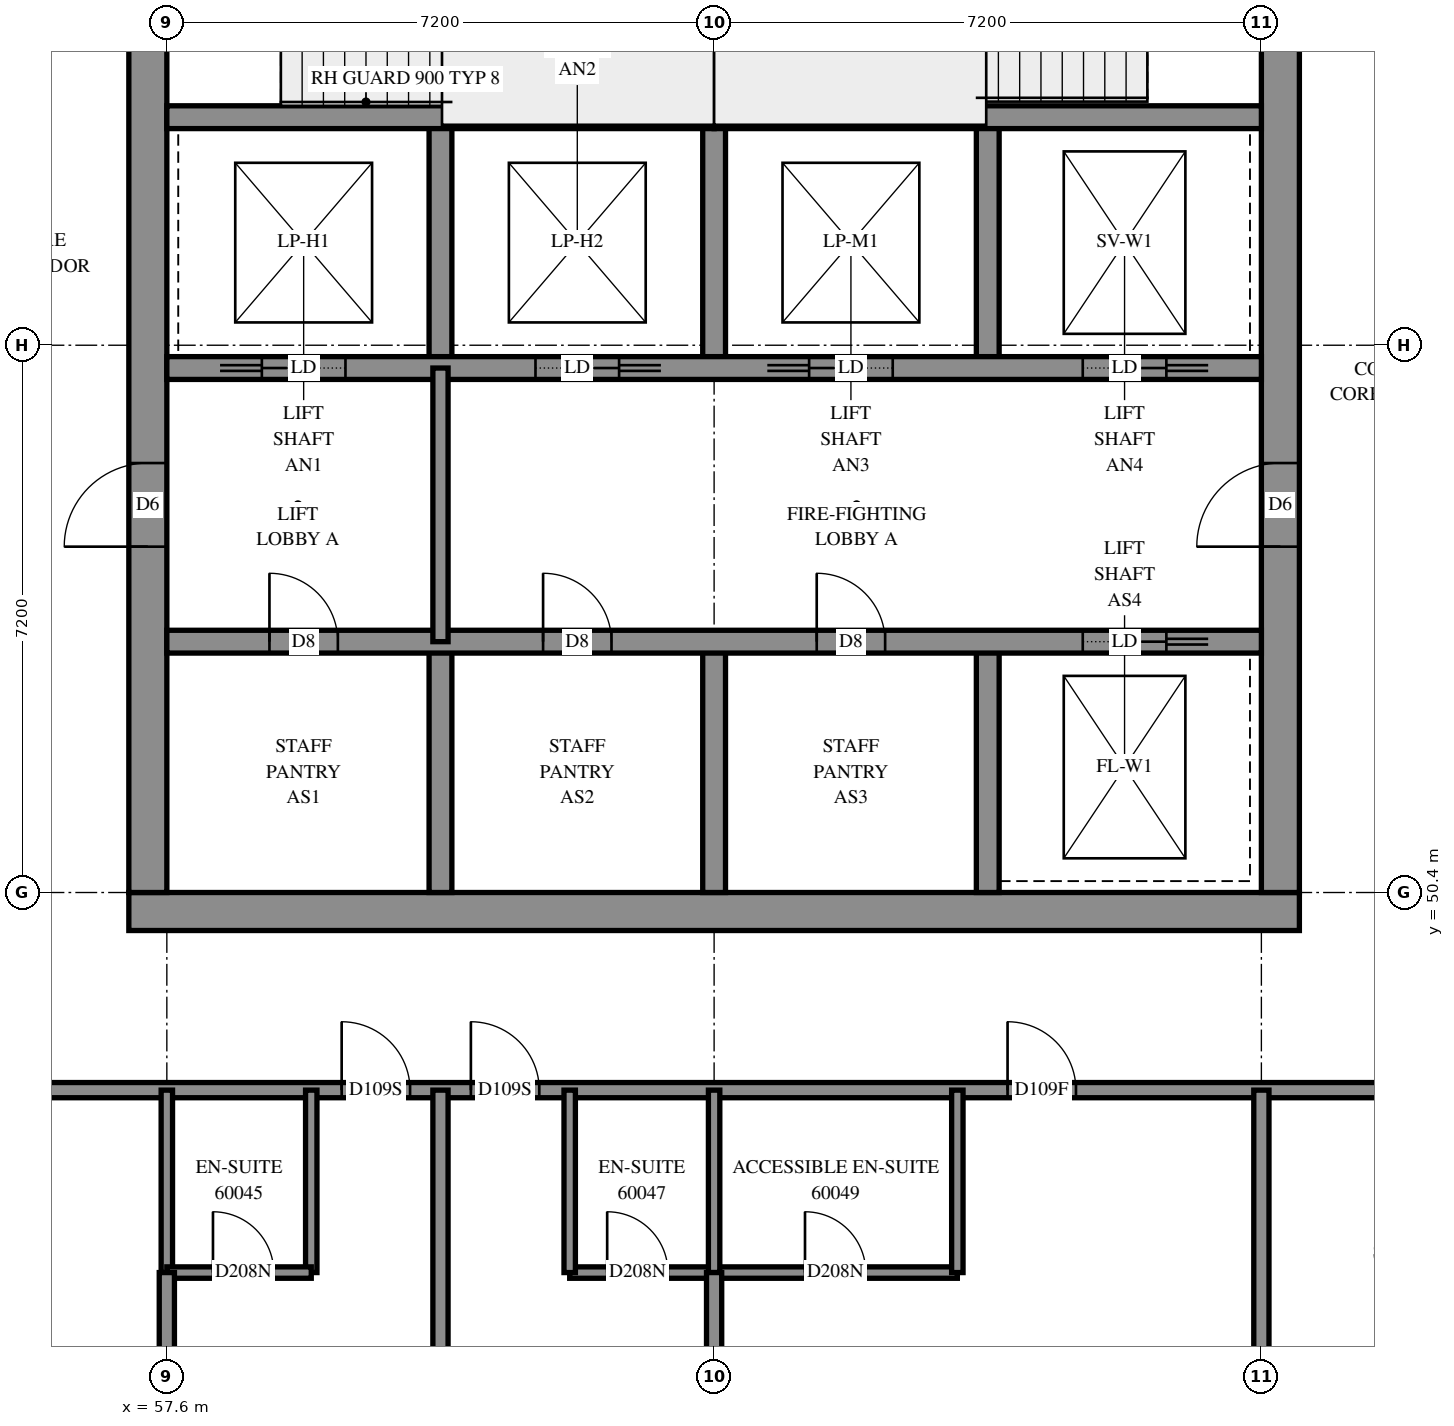
"""IFC4 building model, lengths in metres.
Left out: names, types, materials, properties, quantities, classifications, styles, units other than length and angle.
Written with IfcOpenShell. Run it as: python <this file> out.ifc"""

import sys

from ifc_helpers import new_model, si_unit, direction, frame, frame_2d, origin, place, context, subcontext, project, spatial, rectangle, extrude, element, fill, save


model = new_model("IFC4")
c1 = context("Model", 3, precision=1e-05, world=origin(), true_north=direction((0.0, 1.0)))
c2 = subcontext(c1, "Body", "Model", "MODEL_VIEW")
j1 = project(units=[si_unit("LENGTHUNIT", "METRE"), si_unit("PLANEANGLEUNIT", "RADIAN")], contexts=[c1])
p1 = place(None, origin())
s1 = spatial("IfcSite", under=j1, at=p1, CompositionType="ELEMENT")
p2 = place(p1, origin())
s2 = spatial("IfcBuilding", under=s1, at=p2, CompositionType="ELEMENT")
p3 = place(p2, frame((0.0, 0.0, 220.2)))
s3 = spatial("IfcBuildingStorey", under=s2, at=p3, CompositionType="ELEMENT", Elevation=220.2)
p4 = place(p3, frame((57.1, 50.15, -0.3), z_axis=(0.0, 0.0, 1.0), x_axis=(1.0, 0.0, 0.0)))
e1 = element("IfcWall", 1, at=p4, inside=s3, PredefinedType="SHEAR", context=c2, shape_type="SweptSolid", body=[
    extrude(rectangle(XDim=15.4, YDim=0.5, at=frame_2d((7.7, 0.0))), origin(), (0.0, 0.0, 1.0), 2.7),
])
p5 = place(p3, frame((57.35, 50.4, -0.3), z_axis=(0.0, 0.0, 1.0), x_axis=(0.0, 1.0, 0.0)))
e2 = element("IfcWall", 2, at=p5, inside=s3, PredefinedType="SHEAR", context=c2, shape_type="SweptSolid", body=[
    extrude(rectangle(XDim=14.4, YDim=0.5, at=frame_2d((7.2, 0.0))), origin(), (0.0, 0.0, 1.0), 2.7),
])
p6 = place(p5, frame((4.55, 0.0, 0.3)))
e3 = element("IfcOpeningElement", 3, at=p6, cuts=e2, PredefinedType="OPENING", context=c2, shape_type="SweptSolid", body=[
    extrude(rectangle(XDim=1.1, YDim=2.1, at=frame_2d((0.55, 1.05))), frame((0.0, 0.26, 0.0), z_axis=(0.0, -1.0, 0.0), x_axis=(1.0, 0.0, 0.0)), (0.0, 0.0, 1.0), 0.52),
])
p7 = place(p5, frame((11.35, 0.0, 0.3)))
e4 = element("IfcOpeningElement", 4, at=p7, cuts=e2, PredefinedType="OPENING", context=c2, shape_type="SweptSolid", body=[
    extrude(rectangle(XDim=1.1, YDim=2.1, at=frame_2d((0.55, 1.05))), frame((0.0, 0.26, 0.0), z_axis=(0.0, -1.0, 0.0), x_axis=(1.0, 0.0, 0.0)), (0.0, 0.0, 1.0), 0.52),
])
p8 = place(p3, frame((72.25, 50.4, -0.3), z_axis=(0.0, 0.0, 1.0), x_axis=(0.0, 1.0, 0.0)))
e5 = element("IfcWall", 5, at=p8, inside=s3, PredefinedType="SHEAR", context=c2, shape_type="SweptSolid", body=[
    extrude(rectangle(XDim=14.4, YDim=0.5, at=frame_2d((7.2, 0.0))), origin(), (0.0, 0.0, 1.0), 2.7),
])
p9 = place(p8, frame((4.55, 0.0, 0.3)))
e6 = element("IfcOpeningElement", 6, at=p9, cuts=e5, PredefinedType="OPENING", context=c2, shape_type="SweptSolid", body=[
    extrude(rectangle(XDim=1.1, YDim=2.1, at=frame_2d((0.55, 1.05))), frame((0.0, 0.26, 0.0), z_axis=(0.0, -1.0, 0.0), x_axis=(1.0, 0.0, 0.0)), (0.0, 0.0, 1.0), 0.52),
])
p10 = place(p8, frame((11.35, 0.0, 0.3)))
e7 = element("IfcOpeningElement", 7, at=p10, cuts=e5, PredefinedType="OPENING", context=c2, shape_type="SweptSolid", body=[
    extrude(rectangle(XDim=1.1, YDim=2.1, at=frame_2d((0.55, 1.05))), frame((0.0, 0.26, 0.0), z_axis=(0.0, -1.0, 0.0), x_axis=(1.0, 0.0, 0.0)), (0.0, 0.0, 1.0), 0.52),
])
for number, where, z_axis, x_axis in (
    (8, (61.2, 50.4, 0.0), (0.0, 0.0, 1.0), (0.0, 1.0, 0.0)),
    (9, (61.2, 57.3, 0.0), (0.0, 0.0, 1.0), (0.0, 1.0, 0.0)),
    (10, (64.8, 50.4, 0.0), (0.0, 0.0, 1.0), (0.0, 1.0, 0.0)),
    (11, (64.8, 57.3, 0.0), (0.0, 0.0, 1.0), (0.0, 1.0, 0.0)),
    (12, (68.4, 50.4, 0.0), (0.0, 0.0, 1.0), (0.0, 1.0, 0.0)),
    (13, (68.4, 57.3, 0.0), (0.0, 0.0, 1.0), (0.0, 1.0, 0.0)),
):
    element("IfcWall", number, at=place(p3, frame(where, z_axis=z_axis, x_axis=x_axis)), inside=s3, PredefinedType="SOLIDWALL", context=c2, shape_type="SweptSolid", body=[
        extrude(rectangle(XDim=3.3, YDim=0.3, at=frame_2d((1.65, 0.0))), origin(), (0.0, 0.0, 1.0), 3.1),
    ])
p11 = place(p3, frame((57.6, 53.7, 0.0), z_axis=(0.0, 0.0, 1.0), x_axis=(1.0, 0.0, 0.0)))
e14 = element("IfcWall", 14, at=p11, inside=s3, PredefinedType="SOLIDWALL", context=c2, shape_type="SweptSolid", body=[
    extrude(rectangle(XDim=14.4, YDim=0.3, at=frame_2d((7.2, 0.0))), origin(), (0.0, 0.0, 1.0), 3.1),
])
p12 = place(p11, frame((1.35, 0.0, 0.0)))
e15 = element("IfcOpeningElement", 15, at=p12, cuts=e14, PredefinedType="OPENING", context=c2, shape_type="SweptSolid", body=[
    extrude(rectangle(XDim=0.9, YDim=2.1, at=frame_2d((0.45, 1.05))), frame((0.0, 0.16, 0.0), z_axis=(0.0, -1.0, 0.0), x_axis=(1.0, 0.0, 0.0)), (0.0, 0.0, 1.0), 0.32),
])
p13 = place(p11, frame((4.95, 0.0, 0.0)))
e16 = element("IfcOpeningElement", 16, at=p13, cuts=e14, PredefinedType="OPENING", context=c2, shape_type="SweptSolid", body=[
    extrude(rectangle(XDim=0.9, YDim=2.1, at=frame_2d((0.45, 1.05))), frame((0.0, 0.16, 0.0), z_axis=(0.0, -1.0, 0.0), x_axis=(1.0, 0.0, 0.0)), (0.0, 0.0, 1.0), 0.32),
])
p14 = place(p11, frame((8.55, 0.0, 0.0)))
e17 = element("IfcOpeningElement", 17, at=p14, cuts=e14, PredefinedType="OPENING", context=c2, shape_type="SweptSolid", body=[
    extrude(rectangle(XDim=0.9, YDim=2.1, at=frame_2d((0.45, 1.05))), frame((0.0, 0.16, 0.0), z_axis=(0.0, -1.0, 0.0), x_axis=(1.0, 0.0, 0.0)), (0.0, 0.0, 1.0), 0.32),
])
p15 = place(p11, frame((12.05, 0.0, 0.0)))
e18 = element("IfcOpeningElement", 18, at=p15, cuts=e14, PredefinedType="OPENING", context=c2, shape_type="SweptSolid", body=[
    extrude(rectangle(XDim=1.1, YDim=2.1, at=frame_2d((0.55, 1.05))), frame((0.0, 0.16, 0.0), z_axis=(0.0, -1.0, 0.0), x_axis=(1.0, 0.0, 0.0)), (0.0, 0.0, 1.0), 0.32),
])
p16 = place(p3, frame((57.6, 57.3, 0.0), z_axis=(0.0, 0.0, 1.0), x_axis=(1.0, 0.0, 0.0)))
e19 = element("IfcWall", 19, at=p16, inside=s3, PredefinedType="SOLIDWALL", context=c2, shape_type="SweptSolid", body=[
    extrude(rectangle(XDim=14.4, YDim=0.3, at=frame_2d((7.2, 0.0))), origin(), (0.0, 0.0, 1.0), 3.1),
])
p17 = place(p16, frame((1.25, 0.0, 0.0)))
e20 = element("IfcOpeningElement", 20, at=p17, cuts=e19, PredefinedType="OPENING", context=c2, shape_type="SweptSolid", body=[
    extrude(rectangle(XDim=1.1, YDim=2.1, at=frame_2d((0.55, 1.05))), frame((0.0, 0.16, 0.0), z_axis=(0.0, -1.0, 0.0), x_axis=(1.0, 0.0, 0.0)), (0.0, 0.0, 1.0), 0.32),
])
p18 = place(p16, frame((4.85, 0.0, 0.0)))
e21 = element("IfcOpeningElement", 21, at=p18, cuts=e19, PredefinedType="OPENING", context=c2, shape_type="SweptSolid", body=[
    extrude(rectangle(XDim=1.1, YDim=2.1, at=frame_2d((0.55, 1.05))), frame((0.0, 0.16, 0.0), z_axis=(0.0, -1.0, 0.0), x_axis=(1.0, 0.0, 0.0)), (0.0, 0.0, 1.0), 0.32),
])
p19 = place(p16, frame((8.45, 0.0, 0.0)))
e22 = element("IfcOpeningElement", 22, at=p19, cuts=e19, PredefinedType="OPENING", context=c2, shape_type="SweptSolid", body=[
    extrude(rectangle(XDim=1.1, YDim=2.1, at=frame_2d((0.55, 1.05))), frame((0.0, 0.16, 0.0), z_axis=(0.0, -1.0, 0.0), x_axis=(1.0, 0.0, 0.0)), (0.0, 0.0, 1.0), 0.32),
])
p20 = place(p16, frame((12.05, 0.0, 0.0)))
e23 = element("IfcOpeningElement", 23, at=p20, cuts=e19, PredefinedType="OPENING", context=c2, shape_type="SweptSolid", body=[
    extrude(rectangle(XDim=1.1, YDim=2.1, at=frame_2d((0.55, 1.05))), frame((0.0, 0.16, 0.0), z_axis=(0.0, -1.0, 0.0), x_axis=(1.0, 0.0, 0.0)), (0.0, 0.0, 1.0), 0.32),
])
for number, where, z_axis, x_axis in (
    (24, (57.6, 60.6, 0.0), (0.0, 0.0, 1.0), (1.0, 0.0, 0.0)),
    (25, (64.8, 60.6, 0.0), (0.0, 0.0, 1.0), (1.0, 0.0, 0.0)),
):
    element("IfcWall", number, at=place(p3, frame(where, z_axis=z_axis, x_axis=x_axis)), inside=s3, PredefinedType="SOLIDWALL", context=c2, shape_type="SweptSolid", body=[
        extrude(rectangle(XDim=7.2, YDim=0.3, at=frame_2d((3.6, 0.0))), origin(), (0.0, 0.0, 1.0), 3.1),
    ])
p21 = place(p3, frame((64.8, 60.6, 0.0), z_axis=(0.0, 0.0, 1.0), x_axis=(0.0, 1.0, 0.0)))
e26 = element("IfcWall", 26, at=p21, inside=s3, PredefinedType="SOLIDWALL", context=c2, shape_type="SweptSolid", body=[
    extrude(rectangle(XDim=4.2, YDim=0.3, at=frame_2d((2.1, 0.0))), origin(), (0.0, 0.0, 1.0), 3.1),
])
p22 = place(p3, frame((61.2, 53.7, 0.0), z_axis=(0.0, 0.0, 1.0), x_axis=(0.0, 1.0, 0.0)))
e27 = element("IfcWall", 27, at=p22, inside=s3, PredefinedType="PARTITIONING", context=c2, shape_type="SweptSolid", body=[
    extrude(rectangle(XDim=3.6, YDim=0.2, at=frame_2d((1.8, 0.0))), origin(), (0.0, 0.0, 1.0), 3.1),
])
p23 = place(p3, frame((55.0, 47.8, 0.0), z_axis=(0.0, 0.0, 1.0), x_axis=(1.0, 0.0, 0.0)))
e28 = element("IfcWall", 28, at=p23, inside=s3, PredefinedType="PARTITIONING", context=c2, shape_type="SweptSolid", body=[
    extrude(rectangle(XDim=19.266, YDim=0.2, at=frame_2d((9.633, 0.0))), origin(), (0.0, 0.0, 1.0), 3.1),
])
p24 = place(p23, frame((4.9, 0.0, 0.0)))
e29 = element("IfcOpeningElement", 29, at=p24, cuts=e28, PredefinedType="OPENING", context=c2, shape_type="SweptSolid", body=[
    extrude(rectangle(XDim=0.9, YDim=2.1, at=frame_2d((0.45, 1.05))), frame((0.0, 0.11, 0.0), z_axis=(0.0, -1.0, 0.0), x_axis=(1.0, 0.0, 0.0)), (0.0, 0.0, 1.0), 0.22),
])
p25 = place(p23, frame((6.6, 0.0, 0.0)))
e30 = element("IfcOpeningElement", 30, at=p25, cuts=e28, PredefinedType="OPENING", context=c2, shape_type="SweptSolid", body=[
    extrude(rectangle(XDim=0.9, YDim=2.1, at=frame_2d((0.45, 1.05))), frame((0.0, 0.11, 0.0), z_axis=(0.0, -1.0, 0.0), x_axis=(1.0, 0.0, 0.0)), (0.0, 0.0, 1.0), 0.22),
])
p26 = place(p23, frame((13.661, 0.0, 0.0)))
e31 = element("IfcOpeningElement", 31, at=p26, cuts=e28, PredefinedType="OPENING", context=c2, shape_type="SweptSolid", body=[
    extrude(rectangle(XDim=0.9, YDim=2.1, at=frame_2d((0.45, 1.05))), frame((0.0, 0.11, 0.0), z_axis=(0.0, -1.0, 0.0), x_axis=(1.0, 0.0, 0.0)), (0.0, 0.0, 1.0), 0.22),
])
p27 = place(p3, frame((61.2, 42.324, 0.0), z_axis=(0.0, 0.0, 1.0), x_axis=(0.0, 1.0, 0.0)))
e32 = element("IfcWall", 32, at=p27, inside=s3, PredefinedType="PARTITIONING", context=c2, shape_type="SweptSolid", body=[
    extrude(rectangle(XDim=5.476, YDim=0.2, at=frame_2d((2.738, 0.0))), origin(), (0.0, 0.0, 1.0), 3.1),
])
p28 = place(p3, frame((62.9, 45.4, 0.0), z_axis=(0.0, 0.0, 1.0), x_axis=(1.0, 0.0, 0.0)))
e33 = element("IfcWall", 33, at=p28, inside=s3, PredefinedType="PARTITIONING", context=c2, shape_type="SweptSolid", body=[
    extrude(rectangle(XDim=5.1, YDim=0.15, at=frame_2d((2.55, 0.0))), origin(), (0.0, 0.0, 1.0), 3.1),
])
p29 = place(p28, frame((0.493, 0.0, 0.0)))
e34 = element("IfcOpeningElement", 34, at=p29, cuts=e33, PredefinedType="OPENING", context=c2, shape_type="SweptSolid", body=[
    extrude(rectangle(XDim=0.8, YDim=2.1, at=frame_2d((0.4, 1.05))), frame((0.0, 0.085, 0.0), z_axis=(0.0, -1.0, 0.0), x_axis=(1.0, 0.0, 0.0)), (0.0, 0.0, 1.0), 0.17),
])
p30 = place(p28, frame((3.096, 0.0, 0.0)))
e35 = element("IfcOpeningElement", 35, at=p30, cuts=e33, PredefinedType="OPENING", context=c2, shape_type="SweptSolid", body=[
    extrude(rectangle(XDim=0.8, YDim=2.1, at=frame_2d((0.4, 1.05))), frame((0.0, 0.085, 0.0), z_axis=(0.0, -1.0, 0.0), x_axis=(1.0, 0.0, 0.0)), (0.0, 0.0, 1.0), 0.17),
])
p31 = place(p3, frame((72.0, 43.6, 0.0), z_axis=(0.0, 0.0, 1.0), x_axis=(0.0, 1.0, 0.0)))
e36 = element("IfcWall", 36, at=p31, inside=s3, PredefinedType="PARTITIONING", context=c2, shape_type="SweptSolid", body=[
    extrude(rectangle(XDim=4.2, YDim=0.2, at=frame_2d((2.1, 0.0))), origin(), (0.0, 0.0, 1.0), 3.1),
])
for number, where, z_axis, x_axis in (
    (37, (59.5, 45.4, 0.0), (0.0, 0.0, 1.0), (0.0, 1.0, 0.0)),
    (38, (57.6, 45.4, 0.0), (0.0, 0.0, 1.0), (0.0, 1.0, 0.0)),
    (39, (62.9, 45.4, 0.0), (0.0, 0.0, 1.0), (0.0, 1.0, 0.0)),
    (40, (68.0, 45.4, 0.0), (0.0, 0.0, 1.0), (0.0, 1.0, 0.0)),
    (41, (64.8, 45.4, 0.0), (0.0, 0.0, 1.0), (0.0, 1.0, 0.0)),
):
    element("IfcWall", number, at=place(p3, frame(where, z_axis=z_axis, x_axis=x_axis)), inside=s3, PredefinedType="PARTITIONING", context=c2, shape_type="SweptSolid", body=[
        extrude(rectangle(XDim=2.4, YDim=0.15, at=frame_2d((1.2, 0.0))), origin(), (0.0, 0.0, 1.0), 3.1),
    ])
p32 = place(p3, frame((57.6, 45.4, 0.0), z_axis=(0.0, 0.0, 1.0), x_axis=(1.0, 0.0, 0.0)))
e42 = element("IfcWall", 42, at=p32, inside=s3, PredefinedType="PARTITIONING", context=c2, shape_type="SweptSolid", body=[
    extrude(rectangle(XDim=1.9, YDim=0.15, at=frame_2d((0.95, 0.0))), origin(), (0.0, 0.0, 1.0), 3.1),
])
p33 = place(p32, frame((0.607, 0.0, 0.0)))
e43 = element("IfcOpeningElement", 43, at=p33, cuts=e42, PredefinedType="OPENING", context=c2, shape_type="SweptSolid", body=[
    extrude(rectangle(XDim=0.8, YDim=2.1, at=frame_2d((0.4, 1.05))), frame((0.0, 0.085, 0.0), z_axis=(0.0, -1.0, 0.0), x_axis=(1.0, 0.0, 0.0)), (0.0, 0.0, 1.0), 0.17),
])
for number, where, z_axis, x_axis in (
    (44, (57.6, 43.6, 0.0), (0.0, 0.0, 1.0), (0.0, 1.0, 0.0)),
    (45, (64.8, 43.6, 0.0), (0.0, 0.0, 1.0), (0.0, 1.0, 0.0)),
):
    element("IfcWall", number, at=place(p3, frame(where, z_axis=z_axis, x_axis=x_axis)), inside=s3, PredefinedType="PARTITIONING", context=c2, shape_type="SweptSolid", body=[
        extrude(rectangle(XDim=1.8, YDim=0.2, at=frame_2d((0.9, 0.0))), origin(), (0.0, 0.0, 1.0), 3.1),
    ])
p34 = place(p6, origin())
e46 = element("IfcDoor", 46, at=p34, inside=s3, OperationType="DOUBLE_DOOR_SINGLE_SWING", PredefinedType="DOOR", context=c2, shape_type="SweptSolid", body=[
    extrude(rectangle(XDim=1.1, YDim=2.1, at=frame_2d((0.55, 1.05))), frame((0.0, 0.025, 0.0), z_axis=(0.0, -1.0, 0.0), x_axis=(1.0, 0.0, 0.0)), (0.0, 0.0, 1.0), 0.05),
])
fill(e3, e46)
p35 = place(p9, origin())
e47 = element("IfcDoor", 47, at=p35, inside=s3, OperationType="DOUBLE_DOOR_SINGLE_SWING", PredefinedType="DOOR", context=c2, shape_type="SweptSolid", body=[
    extrude(rectangle(XDim=1.1, YDim=2.1, at=frame_2d((0.55, 1.05))), frame((0.0, 0.025, 0.0), z_axis=(0.0, -1.0, 0.0), x_axis=(1.0, 0.0, 0.0)), (0.0, 0.0, 1.0), 0.05),
])
fill(e6, e47)
p36 = place(p12, origin())
e48 = element("IfcDoor", 48, at=p36, inside=s3, OperationType="SINGLE_SWING_LEFT", PredefinedType="DOOR", context=c2, shape_type="SweptSolid", body=[
    extrude(rectangle(XDim=0.9, YDim=2.1, at=frame_2d((0.45, 1.05))), frame((0.0, 0.025, 0.0), z_axis=(0.0, -1.0, 0.0), x_axis=(1.0, 0.0, 0.0)), (0.0, 0.0, 1.0), 0.05),
])
fill(e15, e48)
p37 = place(p13, origin())
e49 = element("IfcDoor", 49, at=p37, inside=s3, OperationType="SINGLE_SWING_LEFT", PredefinedType="DOOR", context=c2, shape_type="SweptSolid", body=[
    extrude(rectangle(XDim=0.9, YDim=2.1, at=frame_2d((0.45, 1.05))), frame((0.0, 0.025, 0.0), z_axis=(0.0, -1.0, 0.0), x_axis=(1.0, 0.0, 0.0)), (0.0, 0.0, 1.0), 0.05),
])
fill(e16, e49)
p38 = place(p14, origin())
e50 = element("IfcDoor", 50, at=p38, inside=s3, OperationType="SINGLE_SWING_LEFT", PredefinedType="DOOR", context=c2, shape_type="SweptSolid", body=[
    extrude(rectangle(XDim=0.9, YDim=2.1, at=frame_2d((0.45, 1.05))), frame((0.0, 0.025, 0.0), z_axis=(0.0, -1.0, 0.0), x_axis=(1.0, 0.0, 0.0)), (0.0, 0.0, 1.0), 0.05),
])
fill(e17, e50)
p39 = place(p15, origin())
e51 = element("IfcDoor", 51, at=p39, inside=s3, OperationType="SLIDING_TO_RIGHT", PredefinedType="DOOR", context=c2, shape_type="SweptSolid", body=[
    extrude(rectangle(XDim=1.1, YDim=2.1, at=frame_2d((0.55, 1.05))), frame((0.0, 0.025, 0.0), z_axis=(0.0, -1.0, 0.0), x_axis=(1.0, 0.0, 0.0)), (0.0, 0.0, 1.0), 0.05),
])
fill(e18, e51)
p40 = place(p17, origin())
e52 = element("IfcDoor", 52, at=p40, inside=s3, OperationType="SLIDING_TO_LEFT", PredefinedType="DOOR", context=c2, shape_type="SweptSolid", body=[
    extrude(rectangle(XDim=1.1, YDim=2.1, at=frame_2d((0.55, 1.05))), frame((0.0, 0.025, 0.0), z_axis=(0.0, -1.0, 0.0), x_axis=(1.0, 0.0, 0.0)), (0.0, 0.0, 1.0), 0.05),
])
fill(e20, e52)
p41 = place(p18, origin())
e53 = element("IfcDoor", 53, at=p41, inside=s3, OperationType="SLIDING_TO_RIGHT", PredefinedType="DOOR", context=c2, shape_type="SweptSolid", body=[
    extrude(rectangle(XDim=1.1, YDim=2.1, at=frame_2d((0.55, 1.05))), frame((0.0, 0.025, 0.0), z_axis=(0.0, -1.0, 0.0), x_axis=(1.0, 0.0, 0.0)), (0.0, 0.0, 1.0), 0.05),
])
fill(e21, e53)
p42 = place(p19, origin())
e54 = element("IfcDoor", 54, at=p42, inside=s3, OperationType="SLIDING_TO_LEFT", PredefinedType="DOOR", context=c2, shape_type="SweptSolid", body=[
    extrude(rectangle(XDim=1.1, YDim=2.1, at=frame_2d((0.55, 1.05))), frame((0.0, 0.025, 0.0), z_axis=(0.0, -1.0, 0.0), x_axis=(1.0, 0.0, 0.0)), (0.0, 0.0, 1.0), 0.05),
])
fill(e22, e54)
p43 = place(p20, origin())
e55 = element("IfcDoor", 55, at=p43, inside=s3, OperationType="SLIDING_TO_RIGHT", PredefinedType="DOOR", context=c2, shape_type="SweptSolid", body=[
    extrude(rectangle(XDim=1.1, YDim=2.1, at=frame_2d((0.55, 1.05))), frame((0.0, 0.025, 0.0), z_axis=(0.0, -1.0, 0.0), x_axis=(1.0, 0.0, 0.0)), (0.0, 0.0, 1.0), 0.05),
])
fill(e23, e55)
p44 = place(p24, origin())
e56 = element("IfcDoor", 56, at=p44, inside=s3, OperationType="SINGLE_SWING_LEFT", PredefinedType="DOOR", context=c2, shape_type="SweptSolid", body=[
    extrude(rectangle(XDim=0.9, YDim=2.1, at=frame_2d((0.45, 1.05))), frame((0.0, 0.025, 0.0), z_axis=(0.0, -1.0, 0.0), x_axis=(1.0, 0.0, 0.0)), (0.0, 0.0, 1.0), 0.05),
])
fill(e29, e56)
p45 = place(p33, origin())
e57 = element("IfcDoor", 57, at=p45, inside=s3, OperationType="SINGLE_SWING_RIGHT", PredefinedType="DOOR", context=c2, shape_type="SweptSolid", body=[
    extrude(rectangle(XDim=0.8, YDim=2.1, at=frame_2d((0.4, 1.05))), frame((0.0, 0.025, 0.0), z_axis=(0.0, -1.0, 0.0), x_axis=(1.0, 0.0, 0.0)), (0.0, 0.0, 1.0), 0.05),
])
fill(e43, e57)
p46 = place(p25, origin())
e58 = element("IfcDoor", 58, at=p46, inside=s3, OperationType="SINGLE_SWING_RIGHT", PredefinedType="DOOR", context=c2, shape_type="SweptSolid", body=[
    extrude(rectangle(XDim=0.9, YDim=2.1, at=frame_2d((0.45, 1.05))), frame((0.0, 0.025, 0.0), z_axis=(0.0, -1.0, 0.0), x_axis=(1.0, 0.0, 0.0)), (0.0, 0.0, 1.0), 0.05),
])
fill(e30, e58)
p47 = place(p29, origin())
e59 = element("IfcDoor", 59, at=p47, inside=s3, OperationType="SINGLE_SWING_RIGHT", PredefinedType="DOOR", context=c2, shape_type="SweptSolid", body=[
    extrude(rectangle(XDim=0.8, YDim=2.1, at=frame_2d((0.4, 1.05))), frame((0.0, 0.025, 0.0), z_axis=(0.0, -1.0, 0.0), x_axis=(1.0, 0.0, 0.0)), (0.0, 0.0, 1.0), 0.05),
])
fill(e34, e59)
p48 = place(p26, origin())
e60 = element("IfcDoor", 60, at=p48, inside=s3, OperationType="SINGLE_SWING_LEFT", PredefinedType="DOOR", context=c2, shape_type="SweptSolid", body=[
    extrude(rectangle(XDim=0.9, YDim=2.1, at=frame_2d((0.45, 1.05))), frame((0.0, 0.025, 0.0), z_axis=(0.0, -1.0, 0.0), x_axis=(1.0, 0.0, 0.0)), (0.0, 0.0, 1.0), 0.05),
])
fill(e31, e60)
p49 = place(p30, origin())
e61 = element("IfcDoor", 61, at=p49, inside=s3, OperationType="SINGLE_SWING_RIGHT", PredefinedType="DOOR", context=c2, shape_type="SweptSolid", body=[
    extrude(rectangle(XDim=0.8, YDim=2.1, at=frame_2d((0.4, 1.05))), frame((0.0, 0.025, 0.0), z_axis=(0.0, -1.0, 0.0), x_axis=(1.0, 0.0, 0.0)), (0.0, 0.0, 1.0), 0.05),
])
fill(e35, e61)
save(model, sys.argv[1])
